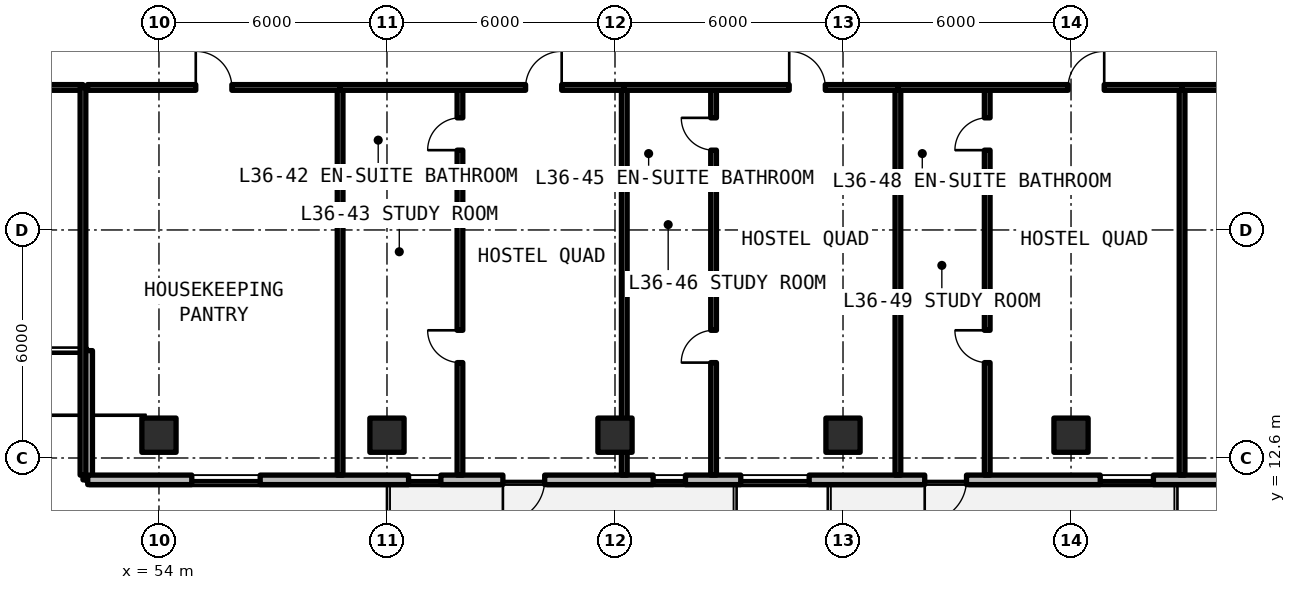
"""IFC4 building model, lengths in metres.
Left out: names, types, materials, properties, quantities, classifications, styles, units other than length and angle.
Written with IfcOpenShell. Run it as: python <this file> out.ifc"""

import sys

from ifc_helpers import new_model, si_unit, direction, frame, frame_2d, origin, origin_2d, place, context, subcontext, project, spatial, rectangle, extrude, element, fill, save


model = new_model("IFC4")
c1 = context("Model", 3, precision=1e-05, world=origin(), true_north=direction((0.0, 1.0)))
c2 = subcontext(c1, "Body", "Model", "MODEL_VIEW")
j1 = project(units=[si_unit("LENGTHUNIT", "METRE"), si_unit("PLANEANGLEUNIT", "RADIAN")], contexts=[c1])
p1 = place(None, origin())
s1 = spatial("IfcSite", under=j1, at=p1, CompositionType="ELEMENT")
p2 = place(p1, origin())
s2 = spatial("IfcBuilding", under=s1, at=p2, CompositionType="ELEMENT")
p3 = place(p2, frame((0.0, 0.0, 132.0)))
s3 = spatial("IfcBuildingStorey", under=s2, at=p3, CompositionType="ELEMENT", Elevation=132.0)
for number, where, z_axis, x_axis in (
    (1, (54.0, 13.2, 0.0), (0.0, 0.0, 1.0), (1.0, 0.0, 0.0)),
    (2, (60.0, 13.2, 0.0), (0.0, 0.0, 1.0), (1.0, 0.0, 0.0)),
    (3, (66.0, 13.2, 0.0), (0.0, 0.0, 1.0), (1.0, 0.0, 0.0)),
    (4, (72.0, 13.2, 0.0), (0.0, 0.0, 1.0), (1.0, 0.0, 0.0)),
    (5, (78.0, 13.2, 0.0), (0.0, 0.0, 1.0), (1.0, 0.0, 0.0)),
):
    element("IfcColumn", number, at=place(p3, frame(where, z_axis=z_axis, x_axis=x_axis)), inside=s3, PredefinedType="COLUMN", context=c2, shape_type="SweptSolid", body=[
        extrude(rectangle(XDim=0.9, YDim=0.9, at=origin_2d()), origin(), (0.0, 0.0, 1.0), 3.3),
    ])
p4 = place(p3, frame((52.125, 15.425, 0.0), z_axis=(0.0, 0.0, 1.0), x_axis=(0.0, -1.0, 0.0)))
e6 = element("IfcWall", 6, at=p4, inside=s3, PredefinedType="SOLIDWALL", context=c2, shape_type="SweptSolid", body=[
    extrude(rectangle(XDim=3.4, YDim=0.25, at=frame_2d((1.7, 0.0))), origin(), (0.0, 0.0, 1.0), 3.08),
])
p5 = place(p3, frame((52.125, 12.025, 0.0), z_axis=(0.0, 0.0, 1.0), x_axis=(1.0, 0.0, 0.0)))
e7 = element("IfcWall", 7, at=p5, inside=s3, PredefinedType="SOLIDWALL", context=c2, shape_type="SweptSolid", body=[
    extrude(rectangle(XDim=43.623, YDim=0.25, at=frame_2d((21.812, 0.0))), origin(), (0.0, 0.0, 1.0), 3.08),
])
p6 = place(p5, frame((10.925, 0.0, 0.0)))
e8 = element("IfcOpeningElement", 8, at=p6, cuts=e7, PredefinedType="OPENING", context=c2, shape_type="SweptSolid", body=[
    extrude(rectangle(XDim=1.1, YDim=2.15, at=frame_2d((0.55, 1.075))), frame((0.0, 0.135, 0.0), z_axis=(0.0, -1.0, 0.0), x_axis=(1.0, 0.0, 0.0)), (0.0, 0.0, 1.0), 0.27),
])
p7 = place(p5, frame((22.025, 0.0, 0.0)))
e9 = element("IfcOpeningElement", 9, at=p7, cuts=e7, PredefinedType="OPENING", context=c2, shape_type="SweptSolid", body=[
    extrude(rectangle(XDim=1.1, YDim=2.15, at=frame_2d((0.55, 1.075))), frame((0.0, 0.135, 0.0), z_axis=(0.0, -1.0, 0.0), x_axis=(1.0, 0.0, 0.0)), (0.0, 0.0, 1.0), 0.27),
])
p8 = place(p5, frame((2.738, 0.0, 0.78)))
e10 = element("IfcOpeningElement", 10, at=p8, cuts=e7, PredefinedType="OPENING", context=c2, shape_type="SweptSolid", body=[
    extrude(rectangle(XDim=1.8, YDim=1.66, at=frame_2d((0.9, 0.83))), frame((0.0, 0.135, 0.0), z_axis=(0.0, -1.0, 0.0), x_axis=(1.0, 0.0, 0.0)), (0.0, 0.0, 1.0), 0.27),
])
p9 = place(p5, frame((8.443, 0.0, 0.78)))
e11 = element("IfcOpeningElement", 11, at=p9, cuts=e7, PredefinedType="OPENING", context=c2, shape_type="SweptSolid", body=[
    extrude(rectangle(XDim=0.85, YDim=1.65, at=frame_2d((0.425, 0.825))), frame((0.0, 0.135, 0.0), z_axis=(0.0, -1.0, 0.0), x_axis=(1.0, 0.0, 0.0)), (0.0, 0.0, 1.0), 0.27),
])
p10 = place(p5, frame((14.879, 0.0, 0.78)))
e12 = element("IfcOpeningElement", 12, at=p10, cuts=e7, PredefinedType="OPENING", context=c2, shape_type="SweptSolid", body=[
    extrude(rectangle(XDim=0.85, YDim=1.65, at=frame_2d((0.425, 0.825))), frame((0.0, 0.135, 0.0), z_axis=(0.0, -1.0, 0.0), x_axis=(1.0, 0.0, 0.0)), (0.0, 0.0, 1.0), 0.27),
])
p11 = place(p5, frame((17.184, 0.0, 0.78)))
e13 = element("IfcOpeningElement", 13, at=p11, cuts=e7, PredefinedType="OPENING", context=c2, shape_type="SweptSolid", body=[
    extrude(rectangle(XDim=1.8, YDim=1.66, at=frame_2d((0.9, 0.83))), frame((0.0, 0.135, 0.0), z_axis=(0.0, -1.0, 0.0), x_axis=(1.0, 0.0, 0.0)), (0.0, 0.0, 1.0), 0.27),
])
p12 = place(p5, frame((26.643, 0.0, 0.78)))
e14 = element("IfcOpeningElement", 14, at=p12, cuts=e7, PredefinedType="OPENING", context=c2, shape_type="SweptSolid", body=[
    extrude(rectangle(XDim=1.4, YDim=1.65, at=frame_2d((0.7, 0.825))), frame((0.0, 0.135, 0.0), z_axis=(0.0, -1.0, 0.0), x_axis=(1.0, 0.0, 0.0)), (0.0, 0.0, 1.0), 0.27),
])
p13 = place(p5, frame((32.777, 0.0, 0.78)))
e15 = element("IfcOpeningElement", 15, at=p13, cuts=e7, PredefinedType="OPENING", context=c2, shape_type="SweptSolid", body=[
    extrude(rectangle(XDim=1.8, YDim=1.66, at=frame_2d((0.9, 0.83))), frame((0.0, 0.135, 0.0), z_axis=(0.0, -1.0, 0.0), x_axis=(1.0, 0.0, 0.0)), (0.0, 0.0, 1.0), 0.27),
])
p14 = place(p5, frame((38.836, 0.0, 0.78)))
e16 = element("IfcOpeningElement", 16, at=p14, cuts=e7, PredefinedType="OPENING", context=c2, shape_type="SweptSolid", body=[
    extrude(rectangle(XDim=1.8, YDim=1.66, at=frame_2d((0.9, 0.83))), frame((0.0, 0.135, 0.0), z_axis=(0.0, -1.0, 0.0), x_axis=(1.0, 0.0, 0.0)), (0.0, 0.0, 1.0), 0.27),
])
p15 = place(p3, frame((43.6, 22.35, 0.0), z_axis=(0.0, 0.0, 1.0), x_axis=(1.0, 0.0, 0.0)))
e17 = element("IfcWall", 17, at=p15, inside=s3, PredefinedType="SOLIDWALL", context=c2, shape_type="SweptSolid", body=[
    extrude(rectangle(XDim=8.4, YDim=0.15, at=frame_2d((4.2, 0.0))), origin(), (0.0, 0.0, 1.0), 2.35),
])
p16 = place(p15, frame((3.65, 0.0, 0.0)))
e18 = element("IfcOpeningElement", 18, at=p16, cuts=e17, PredefinedType="OPENING", context=c2, shape_type="SweptSolid", body=[
    extrude(rectangle(XDim=1.1, YDim=2.15, at=frame_2d((0.55, 1.075))), frame((0.0, 0.085, 0.0), z_axis=(0.0, -1.0, 0.0), x_axis=(1.0, 0.0, 0.0)), (0.0, 0.0, 1.0), 0.17),
])
for number, where, z_axis, x_axis in (
    (19, (52.0, 12.15, 0.0), (0.0, 0.0, 1.0), (0.0, 1.0, 0.0)),
    (20, (58.767, 12.15, 0.0), (0.0, 0.0, 1.0), (0.0, 1.0, 0.0)),
):
    element("IfcWall", number, at=place(p3, frame(where, z_axis=z_axis, x_axis=x_axis)), inside=s3, PredefinedType="SOLIDWALL", context=c2, shape_type="SweptSolid", body=[
        extrude(rectangle(XDim=10.2, YDim=0.15, at=frame_2d((5.1, 0.0))), origin(), (0.0, 0.0, 1.0), 2.35),
    ])
p17 = place(p3, frame((52.12, 22.35, 0.0), z_axis=(0.0, 0.0, 1.0), x_axis=(1.0, 0.0, 0.0)))
e21 = element("IfcWall", 21, at=p17, inside=s3, PredefinedType="SOLIDWALL", context=c2, shape_type="SweptSolid", body=[
    extrude(rectangle(XDim=6.646, YDim=0.15, at=frame_2d((3.323, 0.0))), origin(), (0.0, 0.0, 1.0), 2.35),
])
p18 = place(p17, frame((2.848, 0.0, 0.0)))
e22 = element("IfcOpeningElement", 22, at=p18, cuts=e21, PredefinedType="OPENING", context=c2, shape_type="SweptSolid", body=[
    extrude(rectangle(XDim=0.95, YDim=2.15, at=frame_2d((0.475, 1.075))), frame((0.0, 0.085, 0.0), z_axis=(0.0, -1.0, 0.0), x_axis=(1.0, 0.0, 0.0)), (0.0, 0.0, 1.0), 0.17),
])
p19 = place(p3, frame((66.244, 12.15, 0.0), z_axis=(0.0, 0.0, 1.0), x_axis=(0.0, 1.0, 0.0)))
e23 = element("IfcWall", 23, at=p19, inside=s3, PredefinedType="SOLIDWALL", context=c2, shape_type="SweptSolid", body=[
    extrude(rectangle(XDim=10.2, YDim=0.15, at=frame_2d((5.1, 0.0))), origin(), (0.0, 0.0, 1.0), 2.35),
])
p20 = place(p3, frame((58.767, 19.9, 0.0), z_axis=(0.0, 0.0, 1.0), x_axis=(1.0, 0.0, 0.0)))
e24 = element("IfcWall", 24, at=p20, inside=s3, PredefinedType="PARTITIONING", context=c2, shape_type="SweptSolid", body=[
    extrude(rectangle(XDim=3.153, YDim=0.15, at=frame_2d((1.577, 0.0))), origin(), (0.0, 0.0, 1.0), 2.35),
])
p21 = place(p3, frame((61.92, 12.15, 0.0), z_axis=(0.0, 0.0, 1.0), x_axis=(0.0, 1.0, 0.0)))
e25 = element("IfcWall", 25, at=p21, inside=s3, PredefinedType="PARTITIONING", context=c2, shape_type="SweptSolid", body=[
    extrude(rectangle(XDim=10.2, YDim=0.15, at=frame_2d((5.1, 0.0))), origin(), (0.0, 0.0, 1.0), 2.35),
])
p22 = place(p21, frame((2.96, 0.0, 0.0)))
e26 = element("IfcOpeningElement", 26, at=p22, cuts=e25, PredefinedType="OPENING", context=c2, shape_type="SweptSolid", body=[
    extrude(rectangle(XDim=0.85, YDim=2.1, at=frame_2d((0.425, 1.05))), frame((0.0, 0.085, 0.0), z_axis=(0.0, -1.0, 0.0), x_axis=(1.0, 0.0, 0.0)), (0.0, 0.0, 1.0), 0.17),
])
p23 = place(p21, frame((8.55, 0.0, 0.0)))
e27 = element("IfcOpeningElement", 27, at=p23, cuts=e25, PredefinedType="OPENING", context=c2, shape_type="SweptSolid", body=[
    extrude(rectangle(XDim=0.85, YDim=2.1, at=frame_2d((0.425, 1.05))), frame((0.0, 0.085, 0.0), z_axis=(0.0, -1.0, 0.0), x_axis=(1.0, 0.0, 0.0)), (0.0, 0.0, 1.0), 0.17),
])
p24 = place(p3, frame((58.767, 22.35, 0.0), z_axis=(0.0, 0.0, 1.0), x_axis=(1.0, 0.0, 0.0)))
e28 = element("IfcWall", 28, at=p24, inside=s3, PredefinedType="SOLIDWALL", context=c2, shape_type="SweptSolid", body=[
    extrude(rectangle(XDim=7.478, YDim=0.15, at=frame_2d((3.739, 0.0))), origin(), (0.0, 0.0, 1.0), 2.35),
])
p25 = place(p24, frame((4.881, 0.0, 0.0)))
e29 = element("IfcOpeningElement", 29, at=p25, cuts=e28, PredefinedType="OPENING", context=c2, shape_type="SweptSolid", body=[
    extrude(rectangle(XDim=0.95, YDim=2.15, at=frame_2d((0.475, 1.075))), frame((0.0, 0.085, 0.0), z_axis=(0.0, -1.0, 0.0), x_axis=(1.0, 0.0, 0.0)), (0.0, 0.0, 1.0), 0.17),
])
p26 = place(p3, frame((73.445, 12.15, 0.0), z_axis=(0.0, 0.0, 1.0), x_axis=(0.0, 1.0, 0.0)))
e30 = element("IfcWall", 30, at=p26, inside=s3, PredefinedType="SOLIDWALL", context=c2, shape_type="SweptSolid", body=[
    extrude(rectangle(XDim=10.2, YDim=0.15, at=frame_2d((5.1, 0.0))), origin(), (0.0, 0.0, 1.0), 2.35),
])
p27 = place(p3, frame((66.244, 19.9, 0.0), z_axis=(0.0, 0.0, 1.0), x_axis=(1.0, 0.0, 0.0)))
e31 = element("IfcWall", 31, at=p27, inside=s3, PredefinedType="PARTITIONING", context=c2, shape_type="SweptSolid", body=[
    extrude(rectangle(XDim=2.35, YDim=0.15, at=frame_2d((1.175, 0.0))), origin(), (0.0, 0.0, 1.0), 2.35),
])
p28 = place(p3, frame((68.594, 12.15, 0.0), z_axis=(0.0, 0.0, 1.0), x_axis=(0.0, 1.0, 0.0)))
e32 = element("IfcWall", 32, at=p28, inside=s3, PredefinedType="PARTITIONING", context=c2, shape_type="SweptSolid", body=[
    extrude(rectangle(XDim=10.2, YDim=0.15, at=frame_2d((5.1, 0.0))), origin(), (0.0, 0.0, 1.0), 2.35),
])
p29 = place(p28, frame((2.96, 0.0, 0.0)))
e33 = element("IfcOpeningElement", 33, at=p29, cuts=e32, PredefinedType="OPENING", context=c2, shape_type="SweptSolid", body=[
    extrude(rectangle(XDim=0.85, YDim=2.1, at=frame_2d((0.425, 1.05))), frame((0.0, 0.085, 0.0), z_axis=(0.0, -1.0, 0.0), x_axis=(1.0, 0.0, 0.0)), (0.0, 0.0, 1.0), 0.17),
])
p30 = place(p28, frame((8.55, 0.0, 0.0)))
e34 = element("IfcOpeningElement", 34, at=p30, cuts=e32, PredefinedType="OPENING", context=c2, shape_type="SweptSolid", body=[
    extrude(rectangle(XDim=0.85, YDim=2.1, at=frame_2d((0.425, 1.05))), frame((0.0, 0.085, 0.0), z_axis=(0.0, -1.0, 0.0), x_axis=(1.0, 0.0, 0.0)), (0.0, 0.0, 1.0), 0.17),
])
p31 = place(p3, frame((66.244, 22.35, 0.0), z_axis=(0.0, 0.0, 1.0), x_axis=(1.0, 0.0, 0.0)))
e35 = element("IfcWall", 35, at=p31, inside=s3, PredefinedType="SOLIDWALL", context=c2, shape_type="SweptSolid", body=[
    extrude(rectangle(XDim=7.2, YDim=0.15, at=frame_2d((3.6, 0.0))), origin(), (0.0, 0.0, 1.0), 2.35),
])
p32 = place(p31, frame((4.34, 0.0, 0.0)))
e36 = element("IfcOpeningElement", 36, at=p32, cuts=e35, PredefinedType="OPENING", context=c2, shape_type="SweptSolid", body=[
    extrude(rectangle(XDim=0.95, YDim=2.15, at=frame_2d((0.475, 1.075))), frame((0.0, 0.085, 0.0), z_axis=(0.0, -1.0, 0.0), x_axis=(1.0, 0.0, 0.0)), (0.0, 0.0, 1.0), 0.17),
])
p33 = place(p3, frame((80.922, 12.15, 0.0), z_axis=(0.0, 0.0, 1.0), x_axis=(0.0, 1.0, 0.0)))
e37 = element("IfcWall", 37, at=p33, inside=s3, PredefinedType="SOLIDWALL", context=c2, shape_type="SweptSolid", body=[
    extrude(rectangle(XDim=10.2, YDim=0.15, at=frame_2d((5.1, 0.0))), origin(), (0.0, 0.0, 1.0), 2.35),
])
p34 = place(p3, frame((73.445, 19.9, 0.0), z_axis=(0.0, 0.0, 1.0), x_axis=(1.0, 0.0, 0.0)))
e38 = element("IfcWall", 38, at=p34, inside=s3, PredefinedType="PARTITIONING", context=c2, shape_type="SweptSolid", body=[
    extrude(rectangle(XDim=2.35, YDim=0.15, at=frame_2d((1.175, 0.0))), origin(), (0.0, 0.0, 1.0), 2.35),
])
p35 = place(p3, frame((75.795, 12.15, 0.0), z_axis=(0.0, 0.0, 1.0), x_axis=(0.0, 1.0, 0.0)))
e39 = element("IfcWall", 39, at=p35, inside=s3, PredefinedType="PARTITIONING", context=c2, shape_type="SweptSolid", body=[
    extrude(rectangle(XDim=10.2, YDim=0.15, at=frame_2d((5.1, 0.0))), origin(), (0.0, 0.0, 1.0), 2.35),
])
p36 = place(p35, frame((2.96, 0.0, 0.0)))
e40 = element("IfcOpeningElement", 40, at=p36, cuts=e39, PredefinedType="OPENING", context=c2, shape_type="SweptSolid", body=[
    extrude(rectangle(XDim=0.85, YDim=2.1, at=frame_2d((0.425, 1.05))), frame((0.0, 0.085, 0.0), z_axis=(0.0, -1.0, 0.0), x_axis=(1.0, 0.0, 0.0)), (0.0, 0.0, 1.0), 0.17),
])
p37 = place(p35, frame((8.55, 0.0, 0.0)))
e41 = element("IfcOpeningElement", 41, at=p37, cuts=e39, PredefinedType="OPENING", context=c2, shape_type="SweptSolid", body=[
    extrude(rectangle(XDim=0.85, YDim=2.1, at=frame_2d((0.425, 1.05))), frame((0.0, 0.085, 0.0), z_axis=(0.0, -1.0, 0.0), x_axis=(1.0, 0.0, 0.0)), (0.0, 0.0, 1.0), 0.17),
])
p38 = place(p3, frame((73.445, 22.35, 0.0), z_axis=(0.0, 0.0, 1.0), x_axis=(1.0, 0.0, 0.0)))
e42 = element("IfcWall", 42, at=p38, inside=s3, PredefinedType="SOLIDWALL", context=c2, shape_type="SweptSolid", body=[
    extrude(rectangle(XDim=7.478, YDim=0.15, at=frame_2d((3.739, 0.0))), origin(), (0.0, 0.0, 1.0), 2.35),
])
p39 = place(p38, frame((4.479, 0.0, 0.0)))
e43 = element("IfcOpeningElement", 43, at=p39, cuts=e42, PredefinedType="OPENING", context=c2, shape_type="SweptSolid", body=[
    extrude(rectangle(XDim=0.95, YDim=2.15, at=frame_2d((0.475, 1.075))), frame((0.0, 0.085, 0.0), z_axis=(0.0, -1.0, 0.0), x_axis=(1.0, 0.0, 0.0)), (0.0, 0.0, 1.0), 0.17),
])
p40 = place(p3, frame((80.922, 22.35, 0.0), z_axis=(0.0, 0.0, 1.0), x_axis=(1.0, 0.0, 0.0)))
e44 = element("IfcWall", 44, at=p40, inside=s3, PredefinedType="SOLIDWALL", context=c2, shape_type="SweptSolid", body=[
    extrude(rectangle(XDim=7.2, YDim=0.15, at=frame_2d((3.6, 0.0))), origin(), (0.0, 0.0, 1.0), 2.35),
])
p41 = place(p40, frame((3.125, 0.0, 0.0)))
e45 = element("IfcOpeningElement", 45, at=p41, cuts=e44, PredefinedType="OPENING", context=c2, shape_type="SweptSolid", body=[
    extrude(rectangle(XDim=0.95, YDim=2.15, at=frame_2d((0.475, 1.075))), frame((0.0, 0.085, 0.0), z_axis=(0.0, -1.0, 0.0), x_axis=(1.0, 0.0, 0.0)), (0.0, 0.0, 1.0), 0.17),
])
p42 = place(p6, frame((1.1, 0.0, 0.0), z_axis=(0.0, 0.0, 1.0), x_axis=(-1.0, 0.0, 0.0)))
e46 = element("IfcDoor", 46, at=p42, inside=s3, OperationType="SINGLE_SWING_LEFT", PredefinedType="DOOR", context=c2, shape_type="SweptSolid", body=[
    extrude(rectangle(XDim=1.1, YDim=2.15, at=frame_2d((0.55, 1.075))), frame((0.0, 0.025, 0.0), z_axis=(0.0, -1.0, 0.0), x_axis=(1.0, 0.0, 0.0)), (0.0, 0.0, 1.0), 0.05),
])
fill(e8, e46)
p43 = place(p7, frame((1.1, 0.0, 0.0), z_axis=(0.0, 0.0, 1.0), x_axis=(-1.0, 0.0, 0.0)))
e47 = element("IfcDoor", 47, at=p43, inside=s3, OperationType="SINGLE_SWING_RIGHT", PredefinedType="DOOR", context=c2, shape_type="SweptSolid", body=[
    extrude(rectangle(XDim=1.1, YDim=2.15, at=frame_2d((0.55, 1.075))), frame((0.0, 0.025, 0.0), z_axis=(0.0, -1.0, 0.0), x_axis=(1.0, 0.0, 0.0)), (0.0, 0.0, 1.0), 0.05),
])
fill(e9, e47)
p44 = place(p8, origin())
e48 = element("IfcWindow", 48, at=p44, inside=s3, PartitioningType="SINGLE_PANEL", PredefinedType="WINDOW", context=c2, shape_type="SweptSolid", body=[
    extrude(rectangle(XDim=1.8, YDim=1.66, at=frame_2d((0.9, 0.83))), frame((0.0, 0.03, 0.0), z_axis=(0.0, -1.0, 0.0), x_axis=(1.0, 0.0, 0.0)), (0.0, 0.0, 1.0), 0.06),
])
fill(e10, e48)
p45 = place(p9, origin())
e49 = element("IfcWindow", 49, at=p45, inside=s3, PartitioningType="SINGLE_PANEL", PredefinedType="WINDOW", context=c2, shape_type="SweptSolid", body=[
    extrude(rectangle(XDim=0.85, YDim=1.65, at=frame_2d((0.425, 0.825))), frame((0.0, 0.03, 0.0), z_axis=(0.0, -1.0, 0.0), x_axis=(1.0, 0.0, 0.0)), (0.0, 0.0, 1.0), 0.06),
])
fill(e11, e49)
p46 = place(p10, origin())
e50 = element("IfcWindow", 50, at=p46, inside=s3, PartitioningType="SINGLE_PANEL", PredefinedType="WINDOW", context=c2, shape_type="SweptSolid", body=[
    extrude(rectangle(XDim=0.85, YDim=1.65, at=frame_2d((0.425, 0.825))), frame((0.0, 0.03, 0.0), z_axis=(0.0, -1.0, 0.0), x_axis=(1.0, 0.0, 0.0)), (0.0, 0.0, 1.0), 0.06),
])
fill(e12, e50)
p47 = place(p11, origin())
e51 = element("IfcWindow", 51, at=p47, inside=s3, PartitioningType="SINGLE_PANEL", PredefinedType="WINDOW", context=c2, shape_type="SweptSolid", body=[
    extrude(rectangle(XDim=1.8, YDim=1.66, at=frame_2d((0.9, 0.83))), frame((0.0, 0.03, 0.0), z_axis=(0.0, -1.0, 0.0), x_axis=(1.0, 0.0, 0.0)), (0.0, 0.0, 1.0), 0.06),
])
fill(e13, e51)
p48 = place(p12, origin())
e52 = element("IfcWindow", 52, at=p48, inside=s3, PartitioningType="SINGLE_PANEL", PredefinedType="WINDOW", context=c2, shape_type="SweptSolid", body=[
    extrude(rectangle(XDim=1.4, YDim=1.65, at=frame_2d((0.7, 0.825))), frame((0.0, 0.03, 0.0), z_axis=(0.0, -1.0, 0.0), x_axis=(1.0, 0.0, 0.0)), (0.0, 0.0, 1.0), 0.06),
])
fill(e14, e52)
p49 = place(p18, origin())
e53 = element("IfcDoor", 53, at=p49, inside=s3, OperationType="SINGLE_SWING_LEFT", PredefinedType="DOOR", context=c2, shape_type="SweptSolid", body=[
    extrude(rectangle(XDim=0.95, YDim=2.15, at=frame_2d((0.475, 1.075))), frame((0.0, 0.025, 0.0), z_axis=(0.0, -1.0, 0.0), x_axis=(1.0, 0.0, 0.0)), (0.0, 0.0, 1.0), 0.05),
])
fill(e22, e53)
p50 = place(p22, origin())
e54 = element("IfcDoor", 54, at=p50, inside=s3, OperationType="SINGLE_SWING_RIGHT", PredefinedType="DOOR", context=c2, shape_type="SweptSolid", body=[
    extrude(rectangle(XDim=0.85, YDim=2.1, at=frame_2d((0.425, 1.05))), frame((0.0, 0.025, 0.0), z_axis=(0.0, -1.0, 0.0), x_axis=(1.0, 0.0, 0.0)), (0.0, 0.0, 1.0), 0.05),
])
fill(e26, e54)
p51 = place(p23, origin())
e55 = element("IfcDoor", 55, at=p51, inside=s3, OperationType="SINGLE_SWING_LEFT", PredefinedType="DOOR", context=c2, shape_type="SweptSolid", body=[
    extrude(rectangle(XDim=0.85, YDim=2.1, at=frame_2d((0.425, 1.05))), frame((0.0, 0.025, 0.0), z_axis=(0.0, -1.0, 0.0), x_axis=(1.0, 0.0, 0.0)), (0.0, 0.0, 1.0), 0.05),
])
fill(e27, e55)
p52 = place(p25, origin())
e56 = element("IfcDoor", 56, at=p52, inside=s3, OperationType="SINGLE_SWING_RIGHT", PredefinedType="DOOR", context=c2, shape_type="SweptSolid", body=[
    extrude(rectangle(XDim=0.95, YDim=2.15, at=frame_2d((0.475, 1.075))), frame((0.0, 0.025, 0.0), z_axis=(0.0, -1.0, 0.0), x_axis=(1.0, 0.0, 0.0)), (0.0, 0.0, 1.0), 0.05),
])
fill(e29, e56)
p53 = place(p29, origin())
e57 = element("IfcDoor", 57, at=p53, inside=s3, OperationType="SINGLE_SWING_LEFT", PredefinedType="DOOR", context=c2, shape_type="SweptSolid", body=[
    extrude(rectangle(XDim=0.85, YDim=2.1, at=frame_2d((0.425, 1.05))), frame((0.0, 0.025, 0.0), z_axis=(0.0, -1.0, 0.0), x_axis=(1.0, 0.0, 0.0)), (0.0, 0.0, 1.0), 0.05),
])
fill(e33, e57)
p54 = place(p30, origin())
e58 = element("IfcDoor", 58, at=p54, inside=s3, OperationType="SINGLE_SWING_RIGHT", PredefinedType="DOOR", context=c2, shape_type="SweptSolid", body=[
    extrude(rectangle(XDim=0.85, YDim=2.1, at=frame_2d((0.425, 1.05))), frame((0.0, 0.025, 0.0), z_axis=(0.0, -1.0, 0.0), x_axis=(1.0, 0.0, 0.0)), (0.0, 0.0, 1.0), 0.05),
])
fill(e34, e58)
p55 = place(p32, origin())
e59 = element("IfcDoor", 59, at=p55, inside=s3, OperationType="SINGLE_SWING_LEFT", PredefinedType="DOOR", context=c2, shape_type="SweptSolid", body=[
    extrude(rectangle(XDim=0.95, YDim=2.15, at=frame_2d((0.475, 1.075))), frame((0.0, 0.025, 0.0), z_axis=(0.0, -1.0, 0.0), x_axis=(1.0, 0.0, 0.0)), (0.0, 0.0, 1.0), 0.05),
])
fill(e36, e59)
p56 = place(p36, origin())
e60 = element("IfcDoor", 60, at=p56, inside=s3, OperationType="SINGLE_SWING_RIGHT", PredefinedType="DOOR", context=c2, shape_type="SweptSolid", body=[
    extrude(rectangle(XDim=0.85, YDim=2.1, at=frame_2d((0.425, 1.05))), frame((0.0, 0.025, 0.0), z_axis=(0.0, -1.0, 0.0), x_axis=(1.0, 0.0, 0.0)), (0.0, 0.0, 1.0), 0.05),
])
fill(e40, e60)
p57 = place(p37, origin())
e61 = element("IfcDoor", 61, at=p57, inside=s3, OperationType="SINGLE_SWING_LEFT", PredefinedType="DOOR", context=c2, shape_type="SweptSolid", body=[
    extrude(rectangle(XDim=0.85, YDim=2.1, at=frame_2d((0.425, 1.05))), frame((0.0, 0.025, 0.0), z_axis=(0.0, -1.0, 0.0), x_axis=(1.0, 0.0, 0.0)), (0.0, 0.0, 1.0), 0.05),
])
fill(e41, e61)
p58 = place(p39, origin())
e62 = element("IfcDoor", 62, at=p58, inside=s3, OperationType="SINGLE_SWING_RIGHT", PredefinedType="DOOR", context=c2, shape_type="SweptSolid", body=[
    extrude(rectangle(XDim=0.95, YDim=2.15, at=frame_2d((0.475, 1.075))), frame((0.0, 0.025, 0.0), z_axis=(0.0, -1.0, 0.0), x_axis=(1.0, 0.0, 0.0)), (0.0, 0.0, 1.0), 0.05),
])
fill(e43, e62)
save(model, sys.argv[1])
